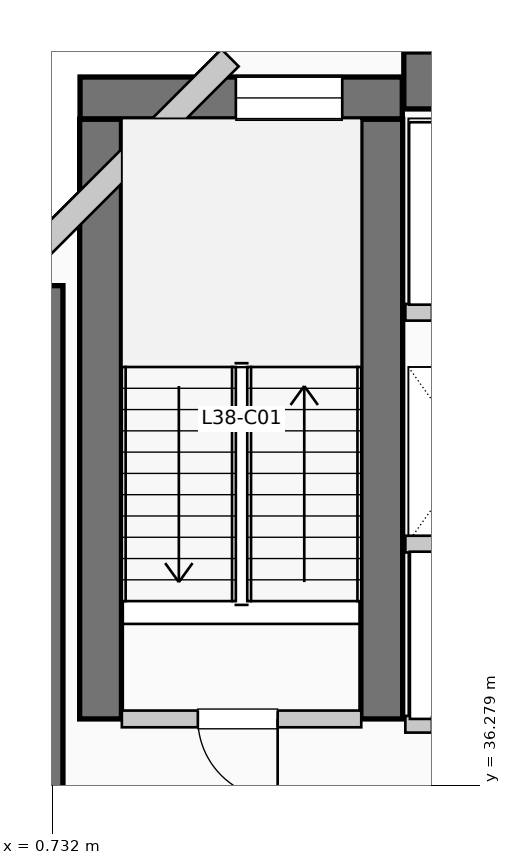
"""IFC4 building model, lengths in metres.
Left out: names, types, materials, properties, quantities, classifications, styles, units other than length and angle.
Written with IfcOpenShell. Run it as: python <this file> out.ifc"""

import sys

from ifc_helpers import new_model, si_unit, direction, frame, frame_2d, origin, place, context, subcontext, project, spatial, rectangle, extrude, element, fill, save


model = new_model("IFC4")
c1 = context("Model", 3, precision=1e-05, world=origin(), true_north=direction((0.0, 1.0)))
c2 = subcontext(c1, "Body", "Model", "MODEL_VIEW")
j1 = project(units=[si_unit("LENGTHUNIT", "METRE"), si_unit("PLANEANGLEUNIT", "RADIAN")], contexts=[c1])
p1 = place(None, origin())
s1 = spatial("IfcSite", under=j1, at=p1, CompositionType="ELEMENT")
p2 = place(p1, origin())
s2 = spatial("IfcBuilding", under=s1, at=p2, CompositionType="ELEMENT")
p3 = place(p2, frame((0.0, 0.0, 158.73)))
s3 = spatial("IfcBuildingStorey", under=s2, at=p3, CompositionType="ELEMENT", Elevation=158.73)
p4 = place(p3, frame((5.36, 45.55, 0.0), z_axis=(0.0, 0.0, 1.0), x_axis=(1.0, 0.0, 0.0)))
e1 = element("IfcWall", 1, at=p4, inside=s3, PredefinedType="SHEAR", context=c2, shape_type="SweptSolid", body=[
    extrude(rectangle(XDim=13.98, YDim=0.75, at=frame_2d((6.99, 0.0))), origin(), (0.0, 0.0, 1.0), 3.96),
])
p5 = place(p3, frame((0.5, 34.95, 0.0), z_axis=(0.0, 0.0, 1.0), x_axis=(0.0, 1.0, 0.0)))
e2 = element("IfcWall", 2, at=p5, inside=s3, PredefinedType="SHEAR", context=c2, shape_type="SweptSolid", body=[
    extrude(rectangle(XDim=7.9, YDim=0.75, at=frame_2d((3.95, 0.0))), origin(), (0.0, 0.0, 1.0), 3.96),
])
for number, where, z_axis, x_axis in (
    (3, (1.37, 37.15, 0.0), (0.0, 0.0, 1.0), (0.0, 1.0, 0.0)),
    (4, (5.07, 37.15, 0.0), (0.0, 0.0, 1.0), (0.0, 1.0, 0.0)),
):
    element("IfcWall", number, at=place(p3, frame(where, z_axis=z_axis, x_axis=x_axis)), inside=s3, PredefinedType="SHEAR", context=c2, shape_type="SweptSolid", body=[
        extrude(rectangle(XDim=7.89, YDim=0.55, at=frame_2d((3.945, 0.0))), origin(), (0.0, 0.0, 1.0), 3.96),
    ])
p6 = place(p3, frame((1.1, 45.32, 0.0), z_axis=(0.0, 0.0, 1.0), x_axis=(1.0, 0.0, 0.0)))
e5 = element("IfcWall", 5, at=p6, inside=s3, PredefinedType="SHEAR", context=c2, shape_type="SweptSolid", body=[
    extrude(rectangle(XDim=4.24, YDim=0.55, at=frame_2d((2.12, 0.0))), origin(), (0.0, 0.0, 1.0), 3.96),
])
p7 = place(p6, frame((2.05, 0.0, 1.05)))
e6 = element("IfcOpeningElement", 6, at=p7, cuts=e5, PredefinedType="OPENING", context=c2, shape_type="SweptSolid", body=[
    extrude(rectangle(XDim=1.4, YDim=1.8, at=frame_2d((0.7, 0.9))), frame((0.0, 0.285, 0.0), z_axis=(0.0, -1.0, 0.0), x_axis=(1.0, 0.0, 0.0)), (0.0, 0.0, 1.0), 0.57),
])
p8 = place(p3, frame((3.074, 45.848, 0.0), z_axis=(0.0, 0.0, 1.0), x_axis=(-0.707106781187, -0.707106781187, 0.0)))
e7 = element("IfcWall", 7, at=p8, inside=s3, PredefinedType="SOLIDWALL", context=c2, shape_type="SweptSolid", body=[
    extrude(rectangle(XDim=4.133, YDim=0.32, at=frame_2d((2.066, 0.0))), origin(), (0.0, 0.0, 1.0), 3.71),
])
p9 = place(p3, frame((1.65, 37.15, 0.0), z_axis=(0.0, 0.0, 1.0), x_axis=(1.0, 0.0, 0.0)))
e8 = element("IfcWall", 8, at=p9, inside=s3, PredefinedType="PARTITIONING", context=c2, shape_type="SweptSolid", body=[
    extrude(rectangle(XDim=3.15, YDim=0.22, at=frame_2d((1.575, 0.0))), origin(), (0.0, 0.0, 1.0), 3.71),
])
p10 = place(p9, frame((2.05, 0.0, 0.0), z_axis=(0.0, 0.0, 1.0), x_axis=(-1.0, 0.0, 0.0)))
e9 = element("IfcOpeningElement", 9, at=p10, cuts=e8, PredefinedType="OPENING", context=c2, shape_type="SweptSolid", body=[
    extrude(rectangle(XDim=1.05, YDim=2.15, at=frame_2d((0.525, 1.075))), frame((0.0, 0.12, 0.0), z_axis=(0.0, -1.0, 0.0), x_axis=(1.0, 0.0, 0.0)), (0.0, 0.0, 1.0), 0.24),
])
p11 = place(p3, frame((5.38, 37.08, 0.0), z_axis=(0.0, 0.0, 1.0), x_axis=(1.0, 0.0, 0.0)))
e10 = element("IfcWall", 10, at=p11, inside=s3, PredefinedType="PARTITIONING", context=c2, shape_type="SweptSolid", body=[
    extrude(rectangle(XDim=3.46, YDim=0.22, at=frame_2d((1.73, 0.0))), origin(), (0.0, 0.0, 1.0), 3.71),
])
p12 = place(p11, frame((1.55, 0.0, 0.0), z_axis=(0.0, 0.0, 1.0), x_axis=(-1.0, 0.0, 0.0)))
e11 = element("IfcOpeningElement", 11, at=p12, cuts=e10, PredefinedType="OPENING", context=c2, shape_type="SweptSolid", body=[
    extrude(rectangle(XDim=1.2, YDim=2.2, at=frame_2d((0.6, 1.1))), frame((0.0, 0.12, 0.0), z_axis=(0.0, -1.0, 0.0), x_axis=(1.0, 0.0, 0.0)), (0.0, 0.0, 1.0), 0.24),
])
p13 = place(p11, frame((3.22, 0.0, 0.0), z_axis=(0.0, 0.0, 1.0), x_axis=(-1.0, 0.0, 0.0)))
e12 = element("IfcOpeningElement", 12, at=p13, cuts=e10, PredefinedType="OPENING", context=c2, shape_type="SweptSolid", body=[
    extrude(rectangle(XDim=1.2, YDim=2.2, at=frame_2d((0.6, 1.1))), frame((0.0, 0.12, 0.0), z_axis=(0.0, -1.0, 0.0), x_axis=(1.0, 0.0, 0.0)), (0.0, 0.0, 1.0), 0.24),
])
p14 = place(p3, frame((5.38, 39.45, 0.0), z_axis=(0.0, 0.0, 1.0), x_axis=(1.0, 0.0, 0.0)))
e13 = element("IfcWall", 13, at=p14, inside=s3, PredefinedType="PARTITIONING", context=c2, shape_type="SweptSolid", body=[
    extrude(rectangle(XDim=3.46, YDim=0.22, at=frame_2d((1.73, 0.0))), origin(), (0.0, 0.0, 1.0), 3.71),
])
p15 = place(p3, frame((5.38, 42.5, 0.0), z_axis=(0.0, 0.0, 1.0), x_axis=(1.0, 0.0, 0.0)))
e14 = element("IfcWall", 14, at=p15, inside=s3, PredefinedType="PARTITIONING", context=c2, shape_type="SweptSolid", body=[
    extrude(rectangle(XDim=3.77, YDim=0.22, at=frame_2d((1.885, 0.0))), origin(), (0.0, 0.0, 1.0), 3.71),
])
p16 = place(p15, frame((1.75, 0.0, 0.0), z_axis=(0.0, 0.0, 1.0), x_axis=(-1.0, 0.0, 0.0)))
e15 = element("IfcOpeningElement", 15, at=p16, cuts=e14, PredefinedType="OPENING", context=c2, shape_type="SweptSolid", body=[
    extrude(rectangle(XDim=1.4, YDim=2.2, at=frame_2d((0.7, 1.1))), frame((0.0, 0.12, 0.0), z_axis=(0.0, -1.0, 0.0), x_axis=(1.0, 0.0, 0.0)), (0.0, 0.0, 1.0), 0.24),
])
p17 = place(p15, frame((3.53, 0.0, 0.0), z_axis=(0.0, 0.0, 1.0), x_axis=(-1.0, 0.0, 0.0)))
e16 = element("IfcOpeningElement", 16, at=p17, cuts=e14, PredefinedType="OPENING", context=c2, shape_type="SweptSolid", body=[
    extrude(rectangle(XDim=1.4, YDim=2.2, at=frame_2d((0.7, 1.1))), frame((0.0, 0.12, 0.0), z_axis=(0.0, -1.0, 0.0), x_axis=(1.0, 0.0, 0.0)), (0.0, 0.0, 1.0), 0.24),
])
p18 = place(p7, origin())
e17 = element("IfcWindow", 17, at=p18, inside=s3, PartitioningType="SINGLE_PANEL", PredefinedType="WINDOW", context=c2, shape_type="SweptSolid", body=[
    extrude(rectangle(XDim=1.4, YDim=1.8, at=frame_2d((0.7, 0.9))), frame((0.0, 0.03, 0.0), z_axis=(0.0, -1.0, 0.0), x_axis=(1.0, 0.0, 0.0)), (0.0, 0.0, 1.0), 0.06),
])
fill(e6, e17)
p19 = place(p10, origin())
e18 = element("IfcDoor", 18, at=p19, inside=s3, OperationType="SINGLE_SWING_RIGHT", PredefinedType="DOOR", context=c2, shape_type="SweptSolid", body=[
    extrude(rectangle(XDim=1.05, YDim=2.15, at=frame_2d((0.525, 1.075))), frame((0.0, 0.025, 0.0), z_axis=(0.0, -1.0, 0.0), x_axis=(1.0, 0.0, 0.0)), (0.0, 0.0, 1.0), 0.05),
])
fill(e9, e18)
save(model, sys.argv[1])
